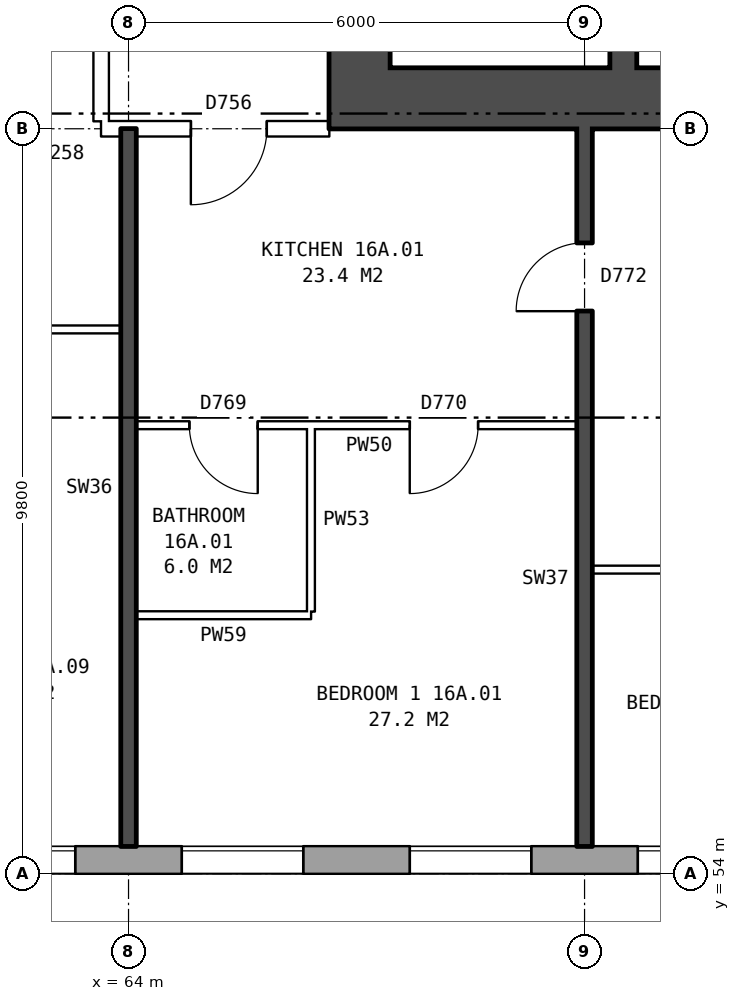
"""IFC4 building model, lengths in metres.
Left out: names, types, materials, properties, quantities, classifications, styles, units other than length and angle.
Written with IfcOpenShell. Run it as: python <this file> out.ifc"""

import sys

from ifc_helpers import new_model, si_unit, direction, frame, frame_2d, origin, place, context, subcontext, project, spatial, rectangle, extrude, element, fill, save


model = new_model("IFC4")
c1 = context("Model", 3, precision=1e-05, world=origin(), true_north=direction((0.0, 1.0)))
c2 = subcontext(c1, "Body", "Model", "MODEL_VIEW")
j1 = project(units=[si_unit("LENGTHUNIT", "METRE"), si_unit("PLANEANGLEUNIT", "RADIAN")], contexts=[c1])
p1 = place(None, origin())
s1 = spatial("IfcSite", under=j1, at=p1, CompositionType="ELEMENT")
p2 = place(p1, origin())
s2 = spatial("IfcBuilding", under=s1, at=p2, CompositionType="ELEMENT")
p3 = place(p2, frame((0.0, 0.0, 59.8)))
s3 = spatial("IfcBuildingStorey", under=s2, at=p3, CompositionType="ELEMENT", Elevation=59.8)
p4 = place(p3, frame((24.575, 54.18, 0.0), z_axis=(0.0, 0.0, 1.0), x_axis=(1.0, 0.0, 0.0)))
e1 = element("IfcWall", 1, at=p4, inside=s3, PredefinedType="STANDARD", context=c2, shape_type="SweptSolid", body=[
    extrude(rectangle(XDim=48.351, YDim=0.36, at=frame_2d((24.175, 0.0))), origin(), (0.0, 0.0, 1.0), 2.85),
])
p5 = place(p4, frame((1.125, 0.0, 0.8)))
e2 = element("IfcOpeningElement", 2, at=p5, cuts=e1, PredefinedType="OPENING", context=c2, shape_type="SweptSolid", body=[
    extrude(rectangle(XDim=1.6, YDim=1.8, at=frame_2d((0.8, 0.9))), frame((0.0, 0.19, 0.0), z_axis=(0.0, -1.0, 0.0), x_axis=(1.0, 0.0, 0.0)), (0.0, 0.0, 1.0), 0.38),
])
p6 = place(p4, frame((4.125, 0.0, 0.8)))
e3 = element("IfcOpeningElement", 3, at=p6, cuts=e1, PredefinedType="OPENING", context=c2, shape_type="SweptSolid", body=[
    extrude(rectangle(XDim=1.6, YDim=1.8, at=frame_2d((0.8, 0.9))), frame((0.0, 0.19, 0.0), z_axis=(0.0, -1.0, 0.0), x_axis=(1.0, 0.0, 0.0)), (0.0, 0.0, 1.0), 0.38),
])
p7 = place(p4, frame((7.125, 0.0, 0.8)))
e4 = element("IfcOpeningElement", 4, at=p7, cuts=e1, PredefinedType="OPENING", context=c2, shape_type="SweptSolid", body=[
    extrude(rectangle(XDim=1.6, YDim=1.8, at=frame_2d((0.8, 0.9))), frame((0.0, 0.19, 0.0), z_axis=(0.0, -1.0, 0.0), x_axis=(1.0, 0.0, 0.0)), (0.0, 0.0, 1.0), 0.38),
])
p8 = place(p4, frame((10.125, 0.0, 0.8)))
e5 = element("IfcOpeningElement", 5, at=p8, cuts=e1, PredefinedType="OPENING", context=c2, shape_type="SweptSolid", body=[
    extrude(rectangle(XDim=1.6, YDim=1.8, at=frame_2d((0.8, 0.9))), frame((0.0, 0.19, 0.0), z_axis=(0.0, -1.0, 0.0), x_axis=(1.0, 0.0, 0.0)), (0.0, 0.0, 1.0), 0.38),
])
p9 = place(p4, frame((13.125, 0.0, 0.8)))
e6 = element("IfcOpeningElement", 6, at=p9, cuts=e1, PredefinedType="OPENING", context=c2, shape_type="SweptSolid", body=[
    extrude(rectangle(XDim=1.6, YDim=1.8, at=frame_2d((0.8, 0.9))), frame((0.0, 0.19, 0.0), z_axis=(0.0, -1.0, 0.0), x_axis=(1.0, 0.0, 0.0)), (0.0, 0.0, 1.0), 0.38),
])
p10 = place(p4, frame((16.125, 0.0, 0.8)))
e7 = element("IfcOpeningElement", 7, at=p10, cuts=e1, PredefinedType="OPENING", context=c2, shape_type="SweptSolid", body=[
    extrude(rectangle(XDim=1.6, YDim=1.8, at=frame_2d((0.8, 0.9))), frame((0.0, 0.19, 0.0), z_axis=(0.0, -1.0, 0.0), x_axis=(1.0, 0.0, 0.0)), (0.0, 0.0, 1.0), 0.38),
])
p11 = place(p4, frame((19.125, 0.0, 0.8)))
e8 = element("IfcOpeningElement", 8, at=p11, cuts=e1, PredefinedType="OPENING", context=c2, shape_type="SweptSolid", body=[
    extrude(rectangle(XDim=1.6, YDim=1.8, at=frame_2d((0.8, 0.9))), frame((0.0, 0.19, 0.0), z_axis=(0.0, -1.0, 0.0), x_axis=(1.0, 0.0, 0.0)), (0.0, 0.0, 1.0), 0.38),
])
p12 = place(p4, frame((22.425, 0.0, 0.15)))
e9 = element("IfcOpeningElement", 9, at=p12, cuts=e1, PredefinedType="OPENING", context=c2, shape_type="SweptSolid", body=[
    extrude(rectangle(XDim=0.6, YDim=0.9, at=frame_2d((0.3, 0.45))), frame((0.0, 0.19, 0.0), z_axis=(0.0, -1.0, 0.0), x_axis=(1.0, 0.0, 0.0)), (0.0, 0.0, 1.0), 0.38),
])
p13 = place(p4, frame((24.575, 0.0, 0.25)))
e10 = element("IfcOpeningElement", 10, at=p13, cuts=e1, PredefinedType="OPENING", context=c2, shape_type="SweptSolid", body=[
    extrude(rectangle(XDim=1.2, YDim=0.9, at=frame_2d((0.6, 0.45))), frame((0.0, 0.19, 0.0), z_axis=(0.0, -1.0, 0.0), x_axis=(1.0, 0.0, 0.0)), (0.0, 0.0, 1.0), 0.38),
])
p14 = place(p4, frame((28.125, 0.0, 0.8)))
e11 = element("IfcOpeningElement", 11, at=p14, cuts=e1, PredefinedType="OPENING", context=c2, shape_type="SweptSolid", body=[
    extrude(rectangle(XDim=1.6, YDim=1.8, at=frame_2d((0.8, 0.9))), frame((0.0, 0.19, 0.0), z_axis=(0.0, -1.0, 0.0), x_axis=(1.0, 0.0, 0.0)), (0.0, 0.0, 1.0), 0.38),
])
p15 = place(p4, frame((31.125, 0.0, 0.8)))
e12 = element("IfcOpeningElement", 12, at=p15, cuts=e1, PredefinedType="OPENING", context=c2, shape_type="SweptSolid", body=[
    extrude(rectangle(XDim=1.6, YDim=1.8, at=frame_2d((0.8, 0.9))), frame((0.0, 0.19, 0.0), z_axis=(0.0, -1.0, 0.0), x_axis=(1.0, 0.0, 0.0)), (0.0, 0.0, 1.0), 0.38),
])
p16 = place(p4, frame((34.125, 0.0, 0.8)))
e13 = element("IfcOpeningElement", 13, at=p16, cuts=e1, PredefinedType="OPENING", context=c2, shape_type="SweptSolid", body=[
    extrude(rectangle(XDim=1.6, YDim=1.8, at=frame_2d((0.8, 0.9))), frame((0.0, 0.19, 0.0), z_axis=(0.0, -1.0, 0.0), x_axis=(1.0, 0.0, 0.0)), (0.0, 0.0, 1.0), 0.38),
])
p17 = place(p4, frame((37.125, 0.0, 0.8)))
e14 = element("IfcOpeningElement", 14, at=p17, cuts=e1, PredefinedType="OPENING", context=c2, shape_type="SweptSolid", body=[
    extrude(rectangle(XDim=1.6, YDim=1.8, at=frame_2d((0.8, 0.9))), frame((0.0, 0.19, 0.0), z_axis=(0.0, -1.0, 0.0), x_axis=(1.0, 0.0, 0.0)), (0.0, 0.0, 1.0), 0.38),
])
p18 = place(p4, frame((40.125, 0.0, 0.8)))
e15 = element("IfcOpeningElement", 15, at=p18, cuts=e1, PredefinedType="OPENING", context=c2, shape_type="SweptSolid", body=[
    extrude(rectangle(XDim=1.6, YDim=1.8, at=frame_2d((0.8, 0.9))), frame((0.0, 0.19, 0.0), z_axis=(0.0, -1.0, 0.0), x_axis=(1.0, 0.0, 0.0)), (0.0, 0.0, 1.0), 0.38),
])
p19 = place(p4, frame((43.125, 0.0, 0.8)))
e16 = element("IfcOpeningElement", 16, at=p19, cuts=e1, PredefinedType="OPENING", context=c2, shape_type="SweptSolid", body=[
    extrude(rectangle(XDim=1.6, YDim=1.8, at=frame_2d((0.8, 0.9))), frame((0.0, 0.19, 0.0), z_axis=(0.0, -1.0, 0.0), x_axis=(1.0, 0.0, 0.0)), (0.0, 0.0, 1.0), 0.38),
])
p20 = place(p4, frame((46.125, 0.0, 0.8)))
e17 = element("IfcOpeningElement", 17, at=p20, cuts=e1, PredefinedType="OPENING", context=c2, shape_type="SweptSolid", body=[
    extrude(rectangle(XDim=1.6, YDim=1.8, at=frame_2d((0.8, 0.9))), frame((0.0, 0.19, 0.0), z_axis=(0.0, -1.0, 0.0), x_axis=(1.0, 0.0, 0.0)), (0.0, 0.0, 1.0), 0.38),
])
p21 = place(p4, frame((23.325, 0.0, 0.15)))
e18 = element("IfcOpeningElement", 18, at=p21, cuts=e1, PredefinedType="OPENING", context=c2, shape_type="SweptSolid", body=[
    extrude(rectangle(XDim=0.8, YDim=1.5, at=frame_2d((0.4, 0.75))), frame((0.0, 0.19, 0.0), z_axis=(0.0, -1.0, 0.0), x_axis=(1.0, 0.0, 0.0)), (0.0, 0.0, 1.0), 0.38),
])
p22 = place(p4, frame((26.425, 0.0, 1.65)))
e19 = element("IfcOpeningElement", 19, at=p22, cuts=e1, PredefinedType="OPENING", context=c2, shape_type="SweptSolid", body=[
    extrude(rectangle(XDim=0.8, YDim=0.9, at=frame_2d((0.4, 0.45))), frame((0.0, 0.19, 0.0), z_axis=(0.0, -1.0, 0.0), x_axis=(1.0, 0.0, 0.0)), (0.0, 0.0, 1.0), 0.38),
])
p23 = place(p3, frame((67.04, 64.6, 0.0), z_axis=(0.0, 0.0, 1.0), x_axis=(0.0, 1.0, 0.0)))
e20 = element("IfcWall", 20, at=p23, inside=s3, PredefinedType="SHEAR", context=c2, shape_type="SweptSolid", body=[
    extrude(rectangle(XDim=10.8, YDim=0.8, at=frame_2d((5.4, 0.0))), origin(), (0.0, 0.0, 1.0), 2.85),
])
p24 = place(p23, frame((0.525, 0.0, 0.0)))
e21 = element("IfcOpeningElement", 21, at=p24, cuts=e20, PredefinedType="OPENING", context=c2, shape_type="SweptSolid", body=[
    extrude(rectangle(XDim=1.1, YDim=2.1, at=frame_2d((0.55, 1.05))), frame((0.0, 0.41, 0.0), z_axis=(0.0, -1.0, 0.0), x_axis=(1.0, 0.0, 0.0)), (0.0, 0.0, 1.0), 0.82),
])
p25 = place(p23, frame((9.1, 0.0, 0.0)))
e22 = element("IfcOpeningElement", 22, at=p25, cuts=e20, PredefinedType="OPENING", context=c2, shape_type="SweptSolid", body=[
    extrude(rectangle(XDim=1.1, YDim=2.1, at=frame_2d((0.55, 1.05))), frame((0.0, 0.41, 0.0), z_axis=(0.0, -1.0, 0.0), x_axis=(1.0, 0.0, 0.0)), (0.0, 0.0, 1.0), 0.82),
])
p26 = place(p3, frame((66.64, 64.2, 0.0), z_axis=(0.0, 0.0, 1.0), x_axis=(1.0, 0.0, 0.0)))
e23 = element("IfcWall", 23, at=p26, inside=s3, PredefinedType="SHEAR", context=c2, shape_type="SweptSolid", body=[
    extrude(rectangle(XDim=9.0, YDim=0.8, at=frame_2d((4.5, 0.0))), origin(), (0.0, 0.0, 1.0), 2.85),
])
p27 = place(p3, frame((70.51, 64.6, 0.0), z_axis=(0.0, 0.0, 1.0), x_axis=(0.0, 1.0, 0.0)))
e24 = element("IfcWall", 24, at=p27, inside=s3, PredefinedType="SHEAR", context=c2, shape_type="SweptSolid", body=[
    extrude(rectangle(XDim=2.075, YDim=0.35, at=frame_2d((1.038, 0.0))), origin(), (0.0, 0.0, 1.0), 2.85),
])
p28 = place(p3, frame((63.64, 63.9, 0.0), z_axis=(0.0, 0.0, 1.0), x_axis=(0.0, 1.0, 0.0)))
e25 = element("IfcWall", 25, at=p28, inside=s3, PredefinedType="PARTITIONING", context=c2, shape_type="SweptSolid", body=[
    extrude(rectangle(XDim=12.2, YDim=0.2, at=frame_2d((6.1, 0.0))), origin(), (0.0, 0.0, 1.0), 2.85),
])
p29 = place(p28, frame((5.1, 0.0, 0.0)))
e26 = element("IfcOpeningElement", 26, at=p29, cuts=e25, PredefinedType="OPENING", context=c2, shape_type="SweptSolid", body=[
    extrude(rectangle(XDim=2.0, YDim=2.1, at=frame_2d((1.0, 1.05))), frame((0.0, 0.11, 0.0), z_axis=(0.0, -1.0, 0.0), x_axis=(1.0, 0.0, 0.0)), (0.0, 0.0, 1.0), 0.22),
])
p30 = place(p3, frame((64.1, 57.4, 0.0), z_axis=(0.0, 0.0, 1.0), x_axis=(1.0, 0.0, 0.0)))
e27 = element("IfcWall", 27, at=p30, inside=s3, PredefinedType="PARTITIONING", context=c2, shape_type="SweptSolid", body=[
    extrude(rectangle(XDim=2.3, YDim=0.1, at=frame_2d((1.15, 0.0))), origin(), (0.0, 0.0, 1.0), 2.85),
])
p31 = place(p3, frame((70.1, 58.0, 0.0), z_axis=(0.0, 0.0, 1.0), x_axis=(1.0, 0.0, 0.0)))
e28 = element("IfcWall", 28, at=p31, inside=s3, PredefinedType="PARTITIONING", context=c2, shape_type="SweptSolid", body=[
    extrude(rectangle(XDim=5.54, YDim=0.1, at=frame_2d((2.77, 0.0))), origin(), (0.0, 0.0, 1.0), 2.85),
])
p32 = place(p31, frame((2.32, 0.0, 0.0)))
e29 = element("IfcOpeningElement", 29, at=p32, cuts=e28, PredefinedType="OPENING", context=c2, shape_type="SweptSolid", body=[
    extrude(rectangle(XDim=0.9, YDim=2.1, at=frame_2d((0.45, 1.05))), frame((0.0, 0.06, 0.0), z_axis=(0.0, -1.0, 0.0), x_axis=(1.0, 0.0, 0.0)), (0.0, 0.0, 1.0), 0.12),
])
p33 = place(p3, frame((64.1, 59.9, 0.0), z_axis=(0.0, 0.0, 1.0), x_axis=(1.0, 0.0, 0.0)))
e30 = element("IfcWall", 30, at=p33, inside=s3, PredefinedType="PARTITIONING", context=c2, shape_type="SweptSolid", body=[
    extrude(rectangle(XDim=5.8, YDim=0.1, at=frame_2d((2.9, 0.0))), origin(), (0.0, 0.0, 1.0), 2.85),
])
p34 = place(p33, frame((3.6, 0.0, 0.0)))
e31 = element("IfcOpeningElement", 31, at=p34, cuts=e30, PredefinedType="OPENING", context=c2, shape_type="SweptSolid", body=[
    extrude(rectangle(XDim=0.9, YDim=2.1, at=frame_2d((0.45, 1.05))), frame((0.0, 0.06, 0.0), z_axis=(0.0, -1.0, 0.0), x_axis=(1.0, 0.0, 0.0)), (0.0, 0.0, 1.0), 0.12),
])
p35 = place(p33, frame((0.7, 0.0, 0.0)))
e32 = element("IfcOpeningElement", 32, at=p35, cuts=e30, PredefinedType="OPENING", context=c2, shape_type="SweptSolid", body=[
    extrude(rectangle(XDim=0.9, YDim=2.1, at=frame_2d((0.45, 1.05))), frame((0.0, 0.06, 0.0), z_axis=(0.0, -1.0, 0.0), x_axis=(1.0, 0.0, 0.0)), (0.0, 0.0, 1.0), 0.12),
])
p36 = place(p3, frame((61.0, 61.16, 0.0), z_axis=(0.0, 0.0, 1.0), x_axis=(1.0, 0.0, 0.0)))
e33 = element("IfcWall", 33, at=p36, inside=s3, PredefinedType="PARTITIONING", context=c2, shape_type="SweptSolid", body=[
    extrude(rectangle(XDim=2.9, YDim=0.1, at=frame_2d((1.45, 0.0))), origin(), (0.0, 0.0, 1.0), 2.85),
])
p37 = place(p36, frame((1.0, 0.0, 0.0)))
e34 = element("IfcOpeningElement", 34, at=p37, cuts=e33, PredefinedType="OPENING", context=c2, shape_type="SweptSolid", body=[
    extrude(rectangle(XDim=0.9, YDim=2.1, at=frame_2d((0.45, 1.05))), frame((0.0, 0.06, 0.0), z_axis=(0.0, -1.0, 0.0), x_axis=(1.0, 0.0, 0.0)), (0.0, 0.0, 1.0), 0.12),
])
p38 = place(p3, frame((63.64, 63.8, 0.0), z_axis=(0.0, 0.0, 1.0), x_axis=(1.0, 0.0, 0.0)))
e35 = element("IfcWall", 35, at=p38, inside=s3, PredefinedType="PARTITIONING", context=c2, shape_type="SweptSolid", body=[
    extrude(rectangle(XDim=3.0, YDim=0.2, at=frame_2d((1.5, 0.0))), origin(), (0.0, 0.0, 1.0), 2.85),
])
p39 = place(p38, frame((1.18, 0.0, 0.0)))
e36 = element("IfcOpeningElement", 36, at=p39, cuts=e35, PredefinedType="OPENING", context=c2, shape_type="SweptSolid", body=[
    extrude(rectangle(XDim=1.0, YDim=2.1, at=frame_2d((0.5, 1.05))), frame((0.0, 0.11, 0.0), z_axis=(0.0, -1.0, 0.0), x_axis=(1.0, 0.0, 0.0)), (0.0, 0.0, 1.0), 0.22),
])
p40 = place(p3, frame((64.0, 54.36, 0.0), z_axis=(0.0, 0.0, 1.0), x_axis=(0.0, 1.0, 0.0)))
e37 = element("IfcWall", 37, at=p40, inside=s3, PredefinedType="SOLIDWALL", context=c2, shape_type="SweptSolid", body=[
    extrude(rectangle(XDim=9.44, YDim=0.2, at=frame_2d((4.72, 0.0))), origin(), (0.0, 0.0, 1.0), 2.85),
])
p41 = place(p3, frame((66.4, 57.45, 0.0), z_axis=(0.0, 0.0, 1.0), x_axis=(0.0, 1.0, 0.0)))
e38 = element("IfcWall", 38, at=p41, inside=s3, PredefinedType="PARTITIONING", context=c2, shape_type="SweptSolid", body=[
    extrude(rectangle(XDim=2.4, YDim=0.1, at=frame_2d((1.2, 0.0))), origin(), (0.0, 0.0, 1.0), 2.85),
])
p42 = place(p3, frame((70.0, 54.36, 0.0), z_axis=(0.0, 0.0, 1.0), x_axis=(0.0, 1.0, 0.0)))
e39 = element("IfcWall", 39, at=p42, inside=s3, PredefinedType="SOLIDWALL", context=c2, shape_type="SweptSolid", body=[
    extrude(rectangle(XDim=9.44, YDim=0.2, at=frame_2d((4.72, 0.0))), origin(), (0.0, 0.0, 1.0), 2.85),
])
p43 = place(p42, frame((7.04, 0.0, 0.0)))
e40 = element("IfcOpeningElement", 40, at=p43, cuts=e39, PredefinedType="OPENING", context=c2, shape_type="SweptSolid", body=[
    extrude(rectangle(XDim=0.9, YDim=2.1, at=frame_2d((0.45, 1.05))), frame((0.0, 0.11, 0.0), z_axis=(0.0, -1.0, 0.0), x_axis=(1.0, 0.0, 0.0)), (0.0, 0.0, 1.0), 0.22),
])
p44 = place(p17, origin())
e41 = element("IfcWindow", 41, at=p44, inside=s3, PartitioningType="SINGLE_PANEL", PredefinedType="WINDOW", context=c2, shape_type="SweptSolid", body=[
    extrude(rectangle(XDim=1.6, YDim=1.8, at=frame_2d((0.8, 0.9))), frame((0.0, 0.15, 0.0), z_axis=(0.0, -1.0, 0.0), x_axis=(1.0, 0.0, 0.0)), (0.0, 0.0, 1.0), 0.06),
])
fill(e14, e41)
p45 = place(p18, origin())
e42 = element("IfcWindow", 42, at=p45, inside=s3, PartitioningType="SINGLE_PANEL", PredefinedType="WINDOW", context=c2, shape_type="SweptSolid", body=[
    extrude(rectangle(XDim=1.6, YDim=1.8, at=frame_2d((0.8, 0.9))), frame((0.0, 0.15, 0.0), z_axis=(0.0, -1.0, 0.0), x_axis=(1.0, 0.0, 0.0)), (0.0, 0.0, 1.0), 0.06),
])
fill(e15, e42)
p46 = place(p19, origin())
e43 = element("IfcWindow", 43, at=p46, inside=s3, PartitioningType="SINGLE_PANEL", PredefinedType="WINDOW", context=c2, shape_type="SweptSolid", body=[
    extrude(rectangle(XDim=1.6, YDim=1.8, at=frame_2d((0.8, 0.9))), frame((0.0, 0.15, 0.0), z_axis=(0.0, -1.0, 0.0), x_axis=(1.0, 0.0, 0.0)), (0.0, 0.0, 1.0), 0.06),
])
fill(e16, e43)
p47 = place(p20, origin())
e44 = element("IfcWindow", 44, at=p47, inside=s3, PartitioningType="SINGLE_PANEL", PredefinedType="WINDOW", context=c2, shape_type="SweptSolid", body=[
    extrude(rectangle(XDim=1.6, YDim=1.8, at=frame_2d((0.8, 0.9))), frame((0.0, 0.15, 0.0), z_axis=(0.0, -1.0, 0.0), x_axis=(1.0, 0.0, 0.0)), (0.0, 0.0, 1.0), 0.06),
])
fill(e17, e44)
p48 = place(p34, frame((0.9, 0.0, 0.0), z_axis=(0.0, 0.0, 1.0), x_axis=(-1.0, 0.0, 0.0)))
e45 = element("IfcDoor", 45, at=p48, inside=s3, OperationType="SINGLE_SWING_RIGHT", PredefinedType="DOOR", context=c2, shape_type="SweptSolid", body=[
    extrude(rectangle(XDim=0.9, YDim=2.1, at=frame_2d((0.45, 1.05))), frame((0.0, 0.025, 0.0), z_axis=(0.0, -1.0, 0.0), x_axis=(1.0, 0.0, 0.0)), (0.0, 0.0, 1.0), 0.05),
])
fill(e31, e45)
p49 = place(p39, frame((1.0, 0.0, 0.0), z_axis=(0.0, 0.0, 1.0), x_axis=(-1.0, 0.0, 0.0)))
e46 = element("IfcDoor", 46, at=p49, inside=s3, OperationType="SINGLE_SWING_RIGHT", PredefinedType="DOOR", context=c2, shape_type="SweptSolid", body=[
    extrude(rectangle(XDim=1.0, YDim=2.1, at=frame_2d((0.5, 1.05))), frame((0.0, 0.025, 0.0), z_axis=(0.0, -1.0, 0.0), x_axis=(1.0, 0.0, 0.0)), (0.0, 0.0, 1.0), 0.05),
])
fill(e36, e46)
p50 = place(p43, origin())
e47 = element("IfcDoor", 47, at=p50, inside=s3, OperationType="SINGLE_SWING_LEFT", PredefinedType="DOOR", context=c2, shape_type="SweptSolid", body=[
    extrude(rectangle(XDim=0.9, YDim=2.1, at=frame_2d((0.45, 1.05))), frame((0.0, 0.025, 0.0), z_axis=(0.0, -1.0, 0.0), x_axis=(1.0, 0.0, 0.0)), (0.0, 0.0, 1.0), 0.05),
])
fill(e40, e47)
p51 = place(p35, frame((0.9, 0.0, 0.0), z_axis=(0.0, 0.0, 1.0), x_axis=(-1.0, 0.0, 0.0)))
e48 = element("IfcDoor", 48, at=p51, inside=s3, OperationType="SINGLE_SWING_LEFT", PredefinedType="DOOR", context=c2, shape_type="SweptSolid", body=[
    extrude(rectangle(XDim=0.9, YDim=2.1, at=frame_2d((0.45, 1.05))), frame((0.0, 0.025, 0.0), z_axis=(0.0, -1.0, 0.0), x_axis=(1.0, 0.0, 0.0)), (0.0, 0.0, 1.0), 0.05),
])
fill(e32, e48)
save(model, sys.argv[1])
